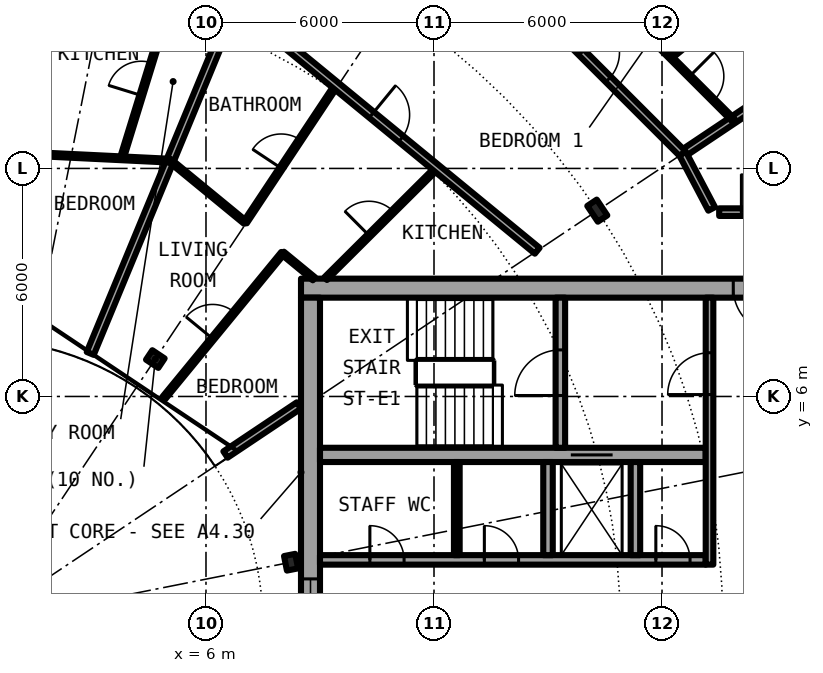
"""IFC4 building model, lengths in metres.
Left out: names, types, materials, properties, quantities, classifications, styles, units other than length and angle.
Written with IfcOpenShell. Run it as: python <this file> out.ifc"""

import sys

from ifc_helpers import new_model, si_unit, direction, frame, frame_2d, origin, origin_2d, place, context, subcontext, project, spatial, rectangle, i_section, extrude, element, fill, save


model = new_model("IFC4")
c1 = context("Model", 3, precision=1e-05, world=origin(), true_north=direction((0.0, 1.0)))
c2 = subcontext(c1, "Body", "Model", "MODEL_VIEW")
j1 = project(units=[si_unit("LENGTHUNIT", "METRE"), si_unit("PLANEANGLEUNIT", "RADIAN")], contexts=[c1])
p1 = place(None, origin())
s1 = spatial("IfcSite", under=j1, at=p1, CompositionType="ELEMENT")
p2 = place(p1, origin())
s2 = spatial("IfcBuilding", under=s1, at=p2, CompositionType="ELEMENT")
p3 = place(p2, frame((0.0, 0.0, 167.7)))
s3 = spatial("IfcBuildingStorey", under=s2, at=p3, CompositionType="ELEMENT", Elevation=167.7)
p4 = place(p3, frame((16.297, 10.889, 0.0), z_axis=(0.0, 0.0, 1.0), x_axis=(0.831469612303, 0.55557023302, 0.0)))
e1 = element("IfcColumn", 1, at=p4, inside=s3, PredefinedType="COLUMN", context=c2, shape_type="SweptSolid", body=[
    extrude(i_section(OverallWidth=0.3, OverallDepth=0.5, WebThickness=0.014, FlangeThickness=0.028, FilletRadius=0.027, at=origin_2d()), origin(), (0.0, 0.0, 1.0), 3.05),
])
for number, where, z_axis, x_axis in (
    (2, (8.239, 1.639, 0.0), (0.0, 0.0, 1.0), (0.981, 0.195, 0.0)),
    (3, (4.667, 6.984, 0.0), (0.0, 0.0, 1.0), (0.556, 0.831, 0.0)),
):
    element("IfcColumn", number, at=place(p3, frame(where, z_axis=z_axis, x_axis=x_axis)), inside=s3, PredefinedType="COLUMN", context=c2, shape_type="SweptSolid", body=[
        extrude(i_section(OverallWidth=0.3, OverallDepth=0.39, WebThickness=0.011, FlangeThickness=0.019, FilletRadius=0.027, at=origin_2d()), origin(), (0.0, 0.0, 1.0), 3.05),
    ])
p5 = place(p3, frame((22.1, 8.85, 0.0), z_axis=(0.0, 0.0, 1.0), x_axis=(-1.0, 0.0, 0.0)))
e4 = element("IfcWall", 4, at=p5, inside=s3, PredefinedType="SHEAR", context=c2, shape_type="SweptSolid", body=[
    extrude(rectangle(XDim=13.6, YDim=0.5, at=frame_2d((6.8, 0.0))), origin(), (0.0, 0.0, 1.0), 3.05),
])
p6 = place(p5, frame((1.025, 0.0, 0.0)))
e5 = element("IfcOpeningElement", 5, at=p6, cuts=e4, PredefinedType="OPENING", context=c2, shape_type="SweptSolid", body=[
    extrude(rectangle(XDim=1.2, YDim=2.3, at=frame_2d((0.6, 1.15))), frame((0.0, 0.26, 0.0), z_axis=(0.0, -1.0, 0.0), x_axis=(1.0, 0.0, 0.0)), (0.0, 0.0, 1.0), 0.52),
])
p7 = place(p3, frame((8.75, -8.6, 0.0), z_axis=(0.0, 0.0, 1.0), x_axis=(0.0, 1.0, 0.0)))
e6 = element("IfcWall", 6, at=p7, inside=s3, PredefinedType="SHEAR", context=c2, shape_type="SweptSolid", body=[
    extrude(rectangle(XDim=17.2, YDim=0.5, at=frame_2d((8.6, 0.0))), origin(), (0.0, 0.0, 1.0), 3.05),
])
p8 = place(p7, frame((7.4, 0.0, 0.1)))
e7 = element("IfcOpeningElement", 7, at=p8, cuts=e6, PredefinedType="OPENING", context=c2, shape_type="SweptSolid", body=[
    extrude(rectangle(XDim=2.4, YDim=2.2, at=frame_2d((1.2, 1.1))), frame((0.0, 0.26, 0.0), z_axis=(0.0, -1.0, 0.0), x_axis=(1.0, 0.0, 0.0)), (0.0, 0.0, 1.0), 0.52),
])
p9 = place(p3, frame((9.0, 1.7, 0.0), z_axis=(0.0, 0.0, 1.0), x_axis=(1.0, 0.0, 0.0)))
e8 = element("IfcWall", 8, at=p9, inside=s3, PredefinedType="SHEAR", context=c2, shape_type="SweptSolid", body=[
    extrude(rectangle(XDim=10.15, YDim=0.25, at=frame_2d((5.075, 0.0))), origin(), (0.0, 0.0, 1.0), 3.05),
])
p10 = place(p9, frame((1.312, 0.0, 0.0)))
e9 = element("IfcOpeningElement", 9, at=p10, cuts=e8, PredefinedType="OPENING", context=c2, shape_type="SweptSolid", body=[
    extrude(rectangle(XDim=0.9, YDim=2.3, at=frame_2d((0.45, 1.15))), frame((0.0, 0.135, 0.0), z_axis=(0.0, -1.0, 0.0), x_axis=(1.0, 0.0, 0.0)), (0.0, 0.0, 1.0), 0.27),
])
p11 = place(p9, frame((4.325, 0.0, 0.0)))
e10 = element("IfcOpeningElement", 10, at=p11, cuts=e8, PredefinedType="OPENING", context=c2, shape_type="SweptSolid", body=[
    extrude(rectangle(XDim=0.9, YDim=2.3, at=frame_2d((0.45, 1.15))), frame((0.0, 0.135, 0.0), z_axis=(0.0, -1.0, 0.0), x_axis=(1.0, 0.0, 0.0)), (0.0, 0.0, 1.0), 0.27),
])
p12 = place(p9, frame((8.837, 0.0, 0.0)))
e11 = element("IfcOpeningElement", 11, at=p12, cuts=e8, PredefinedType="OPENING", context=c2, shape_type="SweptSolid", body=[
    extrude(rectangle(XDim=0.9, YDim=2.3, at=frame_2d((0.45, 1.15))), frame((0.0, 0.135, 0.0), z_axis=(0.0, -1.0, 0.0), x_axis=(1.0, 0.0, 0.0)), (0.0, 0.0, 1.0), 0.27),
])
p13 = place(p3, frame((9.0, 4.462, 0.0), z_axis=(0.0, 0.0, 1.0), x_axis=(1.0, 0.0, 0.0)))
e12 = element("IfcWall", 12, at=p13, inside=s3, PredefinedType="SHEAR", context=c2, shape_type="SweptSolid", body=[
    extrude(rectangle(XDim=10.15, YDim=0.375, at=frame_2d((5.075, 0.0))), origin(), (0.0, 0.0, 1.0), 3.05),
])
p14 = place(p13, frame((6.6, 0.0, 0.0)))
e13 = element("IfcOpeningElement", 13, at=p14, cuts=e12, PredefinedType="OPENING", context=c2, shape_type="SweptSolid", body=[
    extrude(rectangle(XDim=1.1, YDim=2.3, at=frame_2d((0.55, 1.15))), frame((0.0, 0.198, 0.0), z_axis=(0.0, -1.0, 0.0), x_axis=(1.0, 0.0, 0.0)), (0.0, 0.0, 1.0), 0.395),
])
p15 = place(p3, frame((15.325, 4.65, 0.0), z_axis=(0.0, 0.0, 1.0), x_axis=(0.0, 1.0, 0.0)))
e14 = element("IfcWall", 14, at=p15, inside=s3, PredefinedType="SHEAR", context=c2, shape_type="SweptSolid", body=[
    extrude(rectangle(XDim=3.95, YDim=0.25, at=frame_2d((1.975, 0.0))), origin(), (0.0, 0.0, 1.0), 3.05),
])
p16 = place(p15, frame((1.375, 0.0, 0.0)))
e15 = element("IfcOpeningElement", 15, at=p16, cuts=e14, PredefinedType="OPENING", context=c2, shape_type="SweptSolid", body=[
    extrude(rectangle(XDim=1.2, YDim=2.3, at=frame_2d((0.6, 1.15))), frame((0.0, 0.135, 0.0), z_axis=(0.0, -1.0, 0.0), x_axis=(1.0, 0.0, 0.0)), (0.0, 0.0, 1.0), 0.27),
])
for number, where, z_axis, x_axis in (
    (16, (15.0, 1.825, 0.0), (0.0, 0.0, 1.0), (0.0, 1.0, 0.0)),
    (17, (17.3, 1.825, 0.0), (0.0, 0.0, 1.0), (0.0, 1.0, 0.0)),
):
    element("IfcWall", number, at=place(p3, frame(where, z_axis=z_axis, x_axis=x_axis)), inside=s3, PredefinedType="SOLIDWALL", context=c2, shape_type="SweptSolid", body=[
        extrude(rectangle(XDim=2.45, YDim=0.25, at=frame_2d((1.225, 0.0))), origin(), (0.0, 0.0, 1.0), 2.7),
    ])
p17 = place(p3, frame((19.25, 1.575, 0.0), z_axis=(0.0, 0.0, 1.0), x_axis=(0.0, 1.0, 0.0)))
e18 = element("IfcWall", 18, at=p17, inside=s3, PredefinedType="SOLIDWALL", context=c2, shape_type="SweptSolid", body=[
    extrude(rectangle(XDim=7.025, YDim=0.2, at=frame_2d((3.513, 0.0))), origin(), (0.0, 0.0, 1.0), 2.7),
])
p18 = place(p17, frame((4.475, 0.0, 0.0)))
e19 = element("IfcOpeningElement", 19, at=p18, cuts=e18, PredefinedType="OPENING", context=c2, shape_type="SweptSolid", body=[
    extrude(rectangle(XDim=1.1, YDim=2.3, at=frame_2d((0.55, 1.15))), frame((0.0, 0.11, 0.0), z_axis=(0.0, -1.0, 0.0), x_axis=(1.0, 0.0, 0.0)), (0.0, 0.0, 1.0), 0.22),
])
p19 = place(p3, frame((12.6, 1.825, 0.0), z_axis=(0.0, 0.0, 1.0), x_axis=(0.0, 1.0, 0.0)))
e20 = element("IfcWall", 20, at=p19, inside=s3, PredefinedType="PARTITIONING", context=c2, shape_type="SweptSolid", body=[
    extrude(rectangle(XDim=2.45, YDim=0.15, at=frame_2d((1.225, 0.0))), origin(), (0.0, 0.0, 1.0), 2.7),
])
p20 = place(p3, frame((2.954, 7.132, 0.0), z_axis=(0.0, 0.0, 1.0), x_axis=(0.382632652025, 0.923900564782, 0.0)))
e21 = element("IfcWall", 21, at=p20, inside=s3, PredefinedType="PARTITIONING", context=c2, shape_type="SweptSolid", body=[
    extrude(rectangle(XDim=9.98, YDim=0.2, at=frame_2d((4.99, 0.0))), origin(), (0.0, 0.0, 1.0), 2.7),
])
p21 = place(p3, frame((3.785, 12.266, 0.0), z_axis=(0.0, 0.0, 1.0), x_axis=(0.294934866503, 0.955517359612, 0.0)))
e22 = element("IfcWall", 22, at=p21, inside=s3, PredefinedType="PARTITIONING", context=c2, shape_type="SweptSolid", body=[
    extrude(rectangle(XDim=4.364, YDim=0.1, at=frame_2d((2.182, 0.0))), origin(), (0.0, 0.0, 1.0), 2.7),
])
p22 = place(p21, frame((1.732, 0.0, 0.0)))
e23 = element("IfcOpeningElement", 23, at=p22, cuts=e22, PredefinedType="OPENING", context=c2, shape_type="SweptSolid", body=[
    extrude(rectangle(XDim=0.9, YDim=2.3, at=frame_2d((0.45, 1.15))), frame((0.0, 0.06, 0.0), z_axis=(0.0, -1.0, 0.0), x_axis=(1.0, 0.0, 0.0)), (0.0, 0.0, 1.0), 0.12),
])
p23 = place(p3, frame((4.898, 5.968, 0.0), z_axis=(0.0, 0.0, 1.0), x_axis=(0.634401778971, 0.773003481776, 0.0)))
e24 = element("IfcWall", 24, at=p23, inside=s3, PredefinedType="PARTITIONING", context=c2, shape_type="SweptSolid", body=[
    extrude(rectangle(XDim=4.92, YDim=0.1, at=frame_2d((2.46, 0.0))), origin(), (0.0, 0.0, 1.0), 2.7),
])
p24 = place(p23, frame((2.01, 0.0, 0.0)))
e25 = element("IfcOpeningElement", 25, at=p24, cuts=e24, PredefinedType="OPENING", context=c2, shape_type="SweptSolid", body=[
    extrude(rectangle(XDim=0.9, YDim=2.3, at=frame_2d((0.45, 1.15))), frame((0.0, 0.06, 0.0), z_axis=(0.0, -1.0, 0.0), x_axis=(1.0, 0.0, 0.0)), (0.0, 0.0, 1.0), 0.12),
])
p25 = place(p3, frame((7.031, 10.582, 0.0), z_axis=(0.0, 0.0, 1.0), x_axis=(0.553303732327, 0.832979579457, 0.0)))
e26 = element("IfcWall", 26, at=p25, inside=s3, PredefinedType="PARTITIONING", context=c2, shape_type="SweptSolid", body=[
    extrude(rectangle(XDim=4.319, YDim=0.1, at=frame_2d((2.16, 0.0))), origin(), (0.0, 0.0, 1.0), 2.7),
])
p26 = place(p25, frame((1.71, 0.0, 0.0)))
e27 = element("IfcOpeningElement", 27, at=p26, cuts=e26, PredefinedType="OPENING", context=c2, shape_type="SweptSolid", body=[
    extrude(rectangle(XDim=0.9, YDim=2.3, at=frame_2d((0.45, 1.15))), frame((0.0, 0.06, 0.0), z_axis=(0.0, -1.0, 0.0), x_axis=(1.0, 0.0, 0.0)), (0.0, 0.0, 1.0), 0.12),
])
p27 = place(p3, frame((9.148, 9.1, 0.0), z_axis=(0.0, 0.0, 1.0), x_axis=(0.708822693149, 0.705386695138, 0.0)))
e28 = element("IfcWall", 28, at=p27, inside=s3, PredefinedType="PARTITIONING", context=c2, shape_type="SweptSolid", body=[
    extrude(rectangle(XDim=4.121, YDim=0.1, at=frame_2d((2.061, 0.0))), origin(), (0.0, 0.0, 1.0), 2.7),
])
p28 = place(p27, frame((1.611, 0.0, 0.0)))
e29 = element("IfcOpeningElement", 29, at=p28, cuts=e28, PredefinedType="OPENING", context=c2, shape_type="SweptSolid", body=[
    extrude(rectangle(XDim=0.9, YDim=2.3, at=frame_2d((0.45, 1.15))), frame((0.0, 0.06, 0.0), z_axis=(0.0, -1.0, 0.0), x_axis=(1.0, 0.0, 0.0)), (0.0, 0.0, 1.0), 0.12),
])
p29 = place(p3, frame((18.224, 14.927, 0.0), z_axis=(0.0, 0.0, 1.0), x_axis=(0.773548271597, 0.633737383709, 0.0)))
e30 = element("IfcWall", 30, at=p29, inside=s3, PredefinedType="PARTITIONING", context=c2, shape_type="SweptSolid", body=[
    extrude(rectangle(XDim=3.618, YDim=0.1, at=frame_2d((1.809, 0.0))), origin(), (0.0, 0.0, 1.0), 2.7),
])
p30 = place(p3, frame((18.542, 12.389, 0.0), z_axis=(0.0, 0.0, 1.0), x_axis=(0.831387096605, 0.55569370664, 0.0)))
e31 = element("IfcWall", 31, at=p30, inside=s3, PredefinedType="PARTITIONING", context=c2, shape_type="SweptSolid", body=[
    extrude(rectangle(XDim=4.875, YDim=0.2, at=frame_2d((2.438, 0.0))), origin(), (0.0, 0.0, 1.0), 2.7),
])
p31 = place(p3, frame((6.513, 4.472, 0.0), z_axis=(0.0, 0.0, 1.0), x_axis=(0.83133816625, 0.555766905579, 0.0)))
e32 = element("IfcWall", 32, at=p31, inside=s3, PredefinedType="PARTITIONING", context=c2, shape_type="SweptSolid", body=[
    extrude(rectangle(XDim=2.323, YDim=0.2, at=frame_2d((1.162, 0.0))), origin(), (0.0, 0.0, 1.0), 2.7),
])
p32 = place(p3, frame((19.504, 10.85, 0.0), z_axis=(0.0, 0.0, 1.0), x_axis=(1.0, 0.0, 0.0)))
e33 = element("IfcWall", 33, at=p32, inside=s3, PredefinedType="PARTITIONING", context=c2, shape_type="SweptSolid", body=[
    extrude(rectangle(XDim=2.171, YDim=0.2, at=frame_2d((1.085, 0.0))), origin(), (0.0, 0.0, 1.0), 2.7),
])
p33 = place(p32, frame((0.585, 0.0, 0.0)))
e34 = element("IfcOpeningElement", 34, at=p33, cuts=e33, PredefinedType="OPENING", context=c2, shape_type="SweptSolid", body=[
    extrude(rectangle(XDim=1.0, YDim=2.3, at=frame_2d((0.5, 1.15))), frame((0.0, 0.11, 0.0), z_axis=(0.0, -1.0, 0.0), x_axis=(1.0, 0.0, 0.0)), (0.0, 0.0, 1.0), 0.22),
])
p34 = place(p3, frame((1.24, 12.39, 0.0), z_axis=(0.0, 0.0, 1.0), x_axis=(0.998816217325, -0.048643231882, 0.0)))
e35 = element("IfcWall", 35, at=p34, inside=s3, PredefinedType="PARTITIONING", context=c2, shape_type="SweptSolid", body=[
    extrude(rectangle(XDim=3.82, YDim=0.1, at=frame_2d((1.91, 0.0))), origin(), (0.0, 0.0, 1.0), 2.7),
])
p35 = place(p3, frame((5.058, 12.203, 0.0), z_axis=(0.0, 0.0, 1.0), x_axis=(0.772764723682, -0.634692588449, 0.0)))
e36 = element("IfcWall", 36, at=p35, inside=s3, PredefinedType="PARTITIONING", context=c2, shape_type="SweptSolid", body=[
    extrude(rectangle(XDim=2.557, YDim=0.1, at=frame_2d((1.278, 0.0))), origin(), (0.0, 0.0, 1.0), 2.7),
])
p36 = place(p3, frame((8.019, 9.771, 0.0), z_axis=(0.0, 0.0, 1.0), x_axis=(0.772730269942, -0.634734534995, 0.0)))
e37 = element("IfcWall", 37, at=p36, inside=s3, PredefinedType="PARTITIONING", context=c2, shape_type="SweptSolid", body=[
    extrude(rectangle(XDim=1.065, YDim=0.1, at=frame_2d((0.532, 0.0))), origin(), (0.0, 0.0, 1.0), 2.7),
])
p37 = place(p3, frame((6.773, 16.353, 0.0), z_axis=(0.0, 0.0, 1.0), x_axis=(0.773034536097, -0.634363938131, 0.0)))
e38 = element("IfcWall", 38, at=p37, inside=s3, PredefinedType="PARTITIONING", context=c2, shape_type="SweptSolid", body=[
    extrude(rectangle(XDim=10.277, YDim=0.2, at=frame_2d((5.138, 0.0))), origin(), (0.0, 0.0, 1.0), 2.7),
])
p38 = place(p37, frame((4.638, 0.0, 0.0)))
e39 = element("IfcOpeningElement", 39, at=p38, cuts=e38, PredefinedType="OPENING", context=c2, shape_type="SweptSolid", body=[
    extrude(rectangle(XDim=1.0, YDim=2.3, at=frame_2d((0.5, 1.15))), frame((0.0, 0.11, 0.0), z_axis=(0.0, -1.0, 0.0), x_axis=(1.0, 0.0, 0.0)), (0.0, 0.0, 1.0), 0.22),
])
p39 = place(p3, frame((12.389, 18.542, 0.0), z_axis=(0.0, 0.0, 1.0), x_axis=(0.707106781187, -0.707106781187, 0.0)))
e40 = element("IfcWall", 40, at=p39, inside=s3, PredefinedType="PARTITIONING", context=c2, shape_type="SweptSolid", body=[
    extrude(rectangle(XDim=8.702, YDim=0.2, at=frame_2d((4.351, 0.0))), origin(), (0.0, 0.0, 1.0), 2.7),
])
p40 = place(p39, frame((4.938, 0.0, 0.0)))
e41 = element("IfcOpeningElement", 41, at=p40, cuts=e40, PredefinedType="OPENING", context=c2, shape_type="SweptSolid", body=[
    extrude(rectangle(XDim=1.0, YDim=2.3, at=frame_2d((0.5, 1.15))), frame((0.0, 0.11, 0.0), z_axis=(0.0, -1.0, 0.0), x_axis=(1.0, 0.0, 0.0)), (0.0, 0.0, 1.0), 0.22),
])
p41 = place(p3, frame((18.542, 12.389, 0.0), z_axis=(0.0, 0.0, 1.0), x_axis=(0.465605550524, -0.884992356646, 0.0)))
e42 = element("IfcWall", 42, at=p41, inside=s3, PredefinedType="PARTITIONING", context=c2, shape_type="SweptSolid", body=[
    extrude(rectangle(XDim=1.643, YDim=0.2, at=frame_2d((0.821, 0.0))), origin(), (0.0, 0.0, 1.0), 2.7),
])
p42 = place(p3, frame((16.575, 16.575, 0.0), z_axis=(0.0, 0.0, 1.0), x_axis=(0.707132961115, -0.707080600289, 0.0)))
e43 = element("IfcWall", 43, at=p42, inside=s3, PredefinedType="PARTITIONING", context=c2, shape_type="SweptSolid", body=[
    extrude(rectangle(XDim=4.663, YDim=0.1, at=frame_2d((2.331, 0.0))), origin(), (0.0, 0.0, 1.0), 2.7),
])
p43 = place(p42, frame((3.043, 0.0, 0.0)))
e44 = element("IfcOpeningElement", 44, at=p43, cuts=e43, PredefinedType="OPENING", context=c2, shape_type="SweptSolid", body=[
    extrude(rectangle(XDim=0.9, YDim=2.3, at=frame_2d((0.45, 1.15))), frame((0.0, 0.06, 0.0), z_axis=(0.0, -1.0, 0.0), x_axis=(1.0, 0.0, 0.0)), (0.0, 0.0, 1.0), 0.12),
])
p44 = place(p14, origin())
e45 = element("IfcDoor", 45, at=p44, inside=s3, OperationType="DOUBLE_DOOR_SLIDING", PredefinedType="DOOR", context=c2, shape_type="SweptSolid", body=[
    extrude(rectangle(XDim=1.1, YDim=2.3, at=frame_2d((0.55, 1.15))), frame((0.0, 0.025, 0.0), z_axis=(0.0, -1.0, 0.0), x_axis=(1.0, 0.0, 0.0)), (0.0, 0.0, 1.0), 0.05),
])
fill(e13, e45)
p45 = place(p10, origin())
e46 = element("IfcDoor", 46, at=p45, inside=s3, OperationType="SINGLE_SWING_RIGHT", PredefinedType="DOOR", context=c2, shape_type="SweptSolid", body=[
    extrude(rectangle(XDim=0.9, YDim=2.3, at=frame_2d((0.45, 1.15))), frame((0.0, 0.025, 0.0), z_axis=(0.0, -1.0, 0.0), x_axis=(1.0, 0.0, 0.0)), (0.0, 0.0, 1.0), 0.05),
])
fill(e9, e46)
p46 = place(p11, origin())
e47 = element("IfcDoor", 47, at=p46, inside=s3, OperationType="SINGLE_SWING_RIGHT", PredefinedType="DOOR", context=c2, shape_type="SweptSolid", body=[
    extrude(rectangle(XDim=0.9, YDim=2.3, at=frame_2d((0.45, 1.15))), frame((0.0, 0.025, 0.0), z_axis=(0.0, -1.0, 0.0), x_axis=(1.0, 0.0, 0.0)), (0.0, 0.0, 1.0), 0.05),
])
fill(e10, e47)
p47 = place(p12, origin())
e48 = element("IfcDoor", 48, at=p47, inside=s3, OperationType="SINGLE_SWING_LEFT", PredefinedType="DOOR", context=c2, shape_type="SweptSolid", body=[
    extrude(rectangle(XDim=0.9, YDim=2.3, at=frame_2d((0.45, 1.15))), frame((0.0, 0.025, 0.0), z_axis=(0.0, -1.0, 0.0), x_axis=(1.0, 0.0, 0.0)), (0.0, 0.0, 1.0), 0.05),
])
fill(e11, e48)
p48 = place(p16, origin())
e49 = element("IfcDoor", 49, at=p48, inside=s3, OperationType="SINGLE_SWING_LEFT", PredefinedType="DOOR", context=c2, shape_type="SweptSolid", body=[
    extrude(rectangle(XDim=1.2, YDim=2.3, at=frame_2d((0.6, 1.15))), frame((0.0, 0.025, 0.0), z_axis=(0.0, -1.0, 0.0), x_axis=(1.0, 0.0, 0.0)), (0.0, 0.0, 1.0), 0.05),
])
fill(e15, e49)
p49 = place(p18, origin())
e50 = element("IfcDoor", 50, at=p49, inside=s3, OperationType="SINGLE_SWING_LEFT", PredefinedType="DOOR", context=c2, shape_type="SweptSolid", body=[
    extrude(rectangle(XDim=1.1, YDim=2.3, at=frame_2d((0.55, 1.15))), frame((0.0, 0.025, 0.0), z_axis=(0.0, -1.0, 0.0), x_axis=(1.0, 0.0, 0.0)), (0.0, 0.0, 1.0), 0.05),
])
fill(e19, e50)
p50 = place(p6, origin())
e51 = element("IfcDoor", 51, at=p50, inside=s3, OperationType="SINGLE_SWING_RIGHT", PredefinedType="DOOR", context=c2, shape_type="SweptSolid", body=[
    extrude(rectangle(XDim=1.2, YDim=2.3, at=frame_2d((0.6, 1.15))), frame((0.0, 0.025, 0.0), z_axis=(0.0, -1.0, 0.0), x_axis=(1.0, 0.0, 0.0)), (0.0, 0.0, 1.0), 0.05),
])
fill(e5, e51)
p51 = place(p8, origin())
e52 = element("IfcWindow", 52, at=p51, inside=s3, PartitioningType="SINGLE_PANEL", PredefinedType="WINDOW", context=c2, shape_type="SweptSolid", body=[
    extrude(rectangle(XDim=2.4, YDim=2.2, at=frame_2d((1.2, 1.1))), frame((0.0, 0.03, 0.0), z_axis=(0.0, -1.0, 0.0), x_axis=(1.0, 0.0, 0.0)), (0.0, 0.0, 1.0), 0.06),
])
fill(e7, e52)
p52 = place(p40, origin())
e53 = element("IfcDoor", 53, at=p52, inside=s3, OperationType="SINGLE_SWING_RIGHT", PredefinedType="DOOR", context=c2, shape_type="SweptSolid", body=[
    extrude(rectangle(XDim=1.0, YDim=2.3, at=frame_2d((0.5, 1.15))), frame((0.0, 0.025, 0.0), z_axis=(0.0, -1.0, 0.0), x_axis=(1.0, 0.0, 0.0)), (0.0, 0.0, 1.0), 0.05),
])
fill(e41, e53)
p53 = place(p43, origin())
e54 = element("IfcDoor", 54, at=p53, inside=s3, OperationType="SINGLE_SWING_RIGHT", PredefinedType="DOOR", context=c2, shape_type="SweptSolid", body=[
    extrude(rectangle(XDim=0.9, YDim=2.3, at=frame_2d((0.45, 1.15))), frame((0.0, 0.025, 0.0), z_axis=(0.0, -1.0, 0.0), x_axis=(1.0, 0.0, 0.0)), (0.0, 0.0, 1.0), 0.05),
])
fill(e44, e54)
p54 = place(p38, origin())
e55 = element("IfcDoor", 55, at=p54, inside=s3, OperationType="SINGLE_SWING_RIGHT", PredefinedType="DOOR", context=c2, shape_type="SweptSolid", body=[
    extrude(rectangle(XDim=1.0, YDim=2.3, at=frame_2d((0.5, 1.15))), frame((0.0, 0.025, 0.0), z_axis=(0.0, -1.0, 0.0), x_axis=(1.0, 0.0, 0.0)), (0.0, 0.0, 1.0), 0.05),
])
fill(e39, e55)
p55 = place(p26, origin())
e56 = element("IfcDoor", 56, at=p55, inside=s3, OperationType="SINGLE_SWING_LEFT", PredefinedType="DOOR", context=c2, shape_type="SweptSolid", body=[
    extrude(rectangle(XDim=0.9, YDim=2.3, at=frame_2d((0.45, 1.15))), frame((0.0, 0.025, 0.0), z_axis=(0.0, -1.0, 0.0), x_axis=(1.0, 0.0, 0.0)), (0.0, 0.0, 1.0), 0.05),
])
fill(e27, e56)
p56 = place(p28, origin())
e57 = element("IfcDoor", 57, at=p56, inside=s3, OperationType="SINGLE_SWING_LEFT", PredefinedType="DOOR", context=c2, shape_type="SweptSolid", body=[
    extrude(rectangle(XDim=0.9, YDim=2.3, at=frame_2d((0.45, 1.15))), frame((0.0, 0.025, 0.0), z_axis=(0.0, -1.0, 0.0), x_axis=(1.0, 0.0, 0.0)), (0.0, 0.0, 1.0), 0.05),
])
fill(e29, e57)
p57 = place(p24, origin())
e58 = element("IfcDoor", 58, at=p57, inside=s3, OperationType="SINGLE_SWING_RIGHT", PredefinedType="DOOR", context=c2, shape_type="SweptSolid", body=[
    extrude(rectangle(XDim=0.9, YDim=2.3, at=frame_2d((0.45, 1.15))), frame((0.0, 0.025, 0.0), z_axis=(0.0, -1.0, 0.0), x_axis=(1.0, 0.0, 0.0)), (0.0, 0.0, 1.0), 0.05),
])
fill(e25, e58)
p58 = place(p22, origin())
e59 = element("IfcDoor", 59, at=p58, inside=s3, OperationType="SINGLE_SWING_LEFT", PredefinedType="DOOR", context=c2, shape_type="SweptSolid", body=[
    extrude(rectangle(XDim=0.9, YDim=2.3, at=frame_2d((0.45, 1.15))), frame((0.0, 0.025, 0.0), z_axis=(0.0, -1.0, 0.0), x_axis=(1.0, 0.0, 0.0)), (0.0, 0.0, 1.0), 0.05),
])
fill(e23, e59)
p59 = place(p33, origin())
e60 = element("IfcDoor", 60, at=p59, inside=s3, OperationType="SINGLE_SWING_LEFT", PredefinedType="DOOR", context=c2, shape_type="SweptSolid", body=[
    extrude(rectangle(XDim=1.0, YDim=2.3, at=frame_2d((0.5, 1.15))), frame((0.0, 0.025, 0.0), z_axis=(0.0, -1.0, 0.0), x_axis=(1.0, 0.0, 0.0)), (0.0, 0.0, 1.0), 0.05),
])
fill(e34, e60)
save(model, sys.argv[1])
